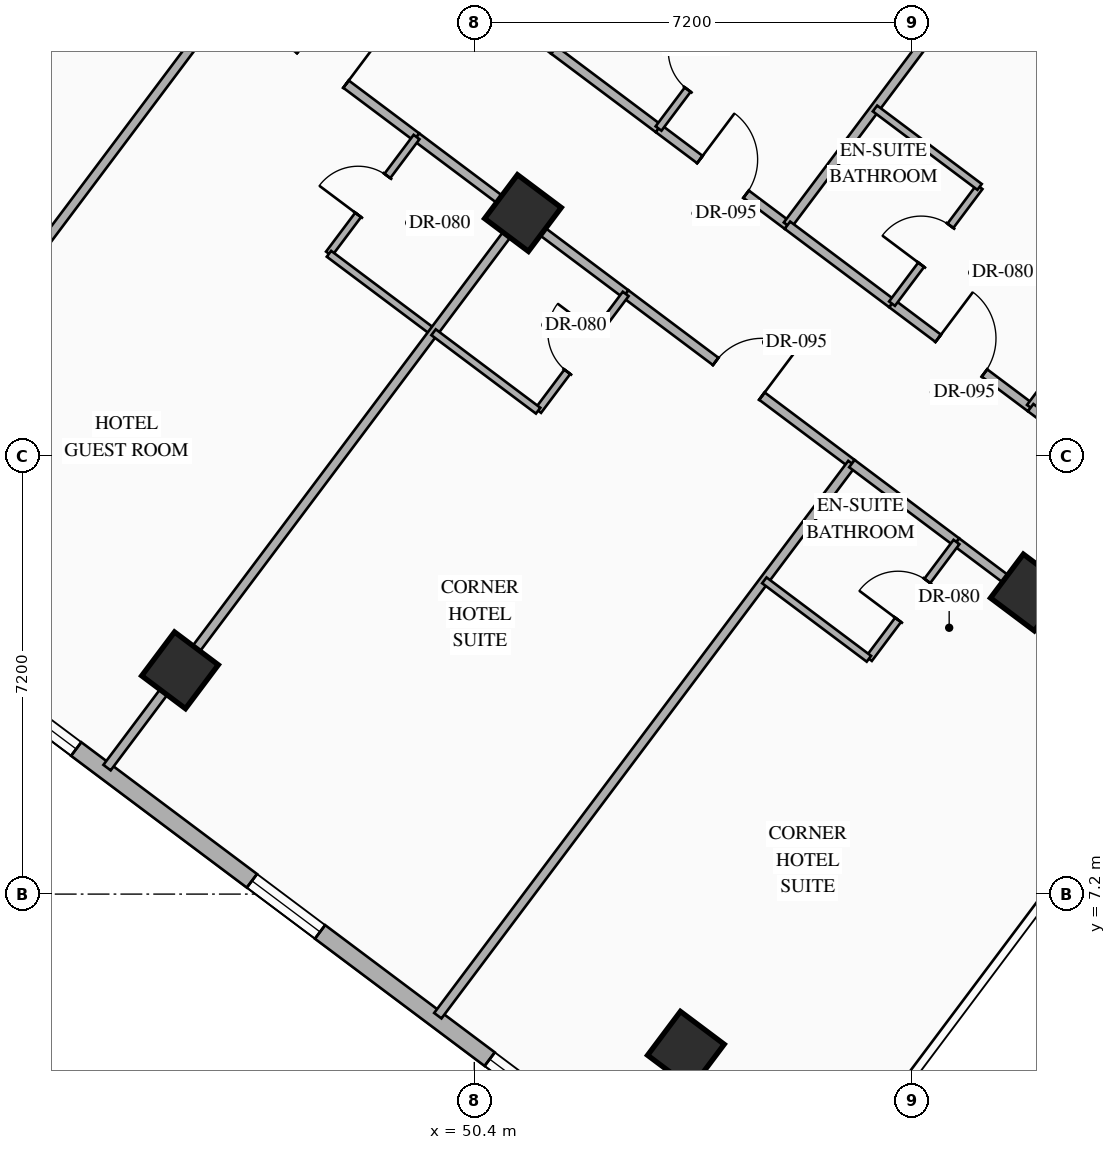
"""IFC4 building model, lengths in metres.
Left out: names, types, materials, properties, quantities, classifications, styles, units other than length and angle.
Written with IfcOpenShell. Run it as: python <this file> out.ifc"""

import sys

from ifc_helpers import new_model, si_unit, direction, frame, frame_2d, origin, origin_2d, place, context, subcontext, project, spatial, rectangle, hollow_rectangle, extrude, element, fill, save


model = new_model("IFC4")
c1 = context("Model", 3, precision=1e-05, world=origin(), true_north=direction((0.0, 1.0)))
c2 = subcontext(c1, "Body", "Model", "MODEL_VIEW")
j1 = project(units=[si_unit("LENGTHUNIT", "METRE"), si_unit("PLANEANGLEUNIT", "RADIAN")], contexts=[c1])
p1 = place(None, origin())
s1 = spatial("IfcSite", under=j1, at=p1, CompositionType="ELEMENT")
p2 = place(p1, origin())
s2 = spatial("IfcBuilding", under=s1, at=p2, CompositionType="ELEMENT")
p3 = place(p2, frame((0.0, 0.0, 81.3)))
s3 = spatial("IfcBuildingStorey", under=s2, at=p3, CompositionType="ELEMENT", Elevation=81.3)
for number, where, z_axis, x_axis in (
    (1, (45.56, 10.88, 0.0), (0.0, 0.0, 1.0), (0.8, -0.6, 0.0)),
    (2, (51.2, 18.4, 0.0), (0.0, 0.0, 1.0), (0.8, -0.6, 0.0)),
    (3, (53.88, 4.64, 0.0), (0.0, 0.0, 1.0), (0.8, -0.6, 0.0)),
    (4, (59.52, 12.16, 0.0), (0.0, 0.0, 1.0), (0.8, -0.6, 0.0)),
):
    element("IfcColumn", number, at=place(p3, frame(where, z_axis=z_axis, x_axis=x_axis)), inside=s3, PredefinedType="COLUMN", context=c2, shape_type="SweptSolid", body=[
        extrude(hollow_rectangle(XDim=0.9, YDim=0.9, WallThickness=0.036, at=origin_2d()), origin(), (0.0, 0.0, 1.0), 3.35),
    ])
p4 = place(p3, frame((53.318, 2.487, 0.0), z_axis=(0.0, 0.0, 1.0), x_axis=(-0.800004174678, 0.599994433723, 0.0)))
e5 = element("IfcWall", 5, at=p4, inside=s3, PredefinedType="STANDARD", context=c2, shape_type="SweptSolid", body=[
    extrude(rectangle(XDim=35.089, YDim=0.28, at=frame_2d((17.544, 0.0))), origin(), (0.0, 0.0, 1.0), 3.13),
])
p5 = place(p4, frame((1.931, 0.0, 0.85)))
e6 = element("IfcOpeningElement", 6, at=p5, cuts=e5, PredefinedType="OPENING", context=c2, shape_type="SweptSolid", body=[
    extrude(rectangle(XDim=1.4, YDim=1.8, at=frame_2d((0.7, 0.9))), frame((0.0, 0.15, 0.0), z_axis=(0.0, -1.0, 0.0), x_axis=(1.0, 0.0, 0.0)), (0.0, 0.0, 1.0), 0.3),
])
p6 = place(p4, frame((6.819, 0.0, 0.85)))
e7 = element("IfcOpeningElement", 7, at=p6, cuts=e5, PredefinedType="OPENING", context=c2, shape_type="SweptSolid", body=[
    extrude(rectangle(XDim=1.4, YDim=1.8, at=frame_2d((0.7, 0.9))), frame((0.0, 0.15, 0.0), z_axis=(0.0, -1.0, 0.0), x_axis=(1.0, 0.0, 0.0)), (0.0, 0.0, 1.0), 0.3),
])
p7 = place(p4, frame((11.832, 0.0, 0.85)))
e8 = element("IfcOpeningElement", 8, at=p7, cuts=e5, PredefinedType="OPENING", context=c2, shape_type="SweptSolid", body=[
    extrude(rectangle(XDim=1.4, YDim=1.8, at=frame_2d((0.7, 0.9))), frame((0.0, 0.15, 0.0), z_axis=(0.0, -1.0, 0.0), x_axis=(1.0, 0.0, 0.0)), (0.0, 0.0, 1.0), 0.3),
])
p8 = place(p4, frame((17.647, 0.0, 0.85)))
e9 = element("IfcOpeningElement", 9, at=p8, cuts=e5, PredefinedType="OPENING", context=c2, shape_type="SweptSolid", body=[
    extrude(rectangle(XDim=1.4, YDim=1.8, at=frame_2d((0.7, 0.9))), frame((0.0, 0.15, 0.0), z_axis=(0.0, -1.0, 0.0), x_axis=(1.0, 0.0, 0.0)), (0.0, 0.0, 1.0), 0.3),
])
p9 = place(p4, frame((21.857, 0.0, 0.85)))
e10 = element("IfcOpeningElement", 10, at=p9, cuts=e5, PredefinedType="OPENING", context=c2, shape_type="SweptSolid", body=[
    extrude(rectangle(XDim=1.4, YDim=1.8, at=frame_2d((0.7, 0.9))), frame((0.0, 0.15, 0.0), z_axis=(0.0, -1.0, 0.0), x_axis=(1.0, 0.0, 0.0)), (0.0, 0.0, 1.0), 0.3),
])
p10 = place(p4, frame((26.87, 0.0, 0.85)))
e11 = element("IfcOpeningElement", 11, at=p10, cuts=e5, PredefinedType="OPENING", context=c2, shape_type="SweptSolid", body=[
    extrude(rectangle(XDim=1.4, YDim=1.8, at=frame_2d((0.7, 0.9))), frame((0.0, 0.15, 0.0), z_axis=(0.0, -1.0, 0.0), x_axis=(1.0, 0.0, 0.0)), (0.0, 0.0, 1.0), 0.3),
])
p11 = place(p4, frame((31.757, 0.0, 0.85)))
e12 = element("IfcOpeningElement", 12, at=p11, cuts=e5, PredefinedType="OPENING", context=c2, shape_type="SweptSolid", body=[
    extrude(rectangle(XDim=1.4, YDim=1.8, at=frame_2d((0.7, 0.9))), frame((0.0, 0.15, 0.0), z_axis=(0.0, -1.0, 0.0), x_axis=(1.0, 0.0, 0.0)), (0.0, 0.0, 1.0), 0.3),
])
p12 = place(p3, frame((39.464, 12.752, 0.0), z_axis=(0.0, 0.0, 1.0), x_axis=(0.6, 0.8, 0.0)))
e13 = element("IfcWall", 13, at=p12, inside=s3, PredefinedType="PARTITIONING", context=c2, shape_type="SweptSolid", body=[
    extrude(rectangle(XDim=11.51, YDim=0.15, at=frame_2d((5.755, 0.0))), origin(), (0.0, 0.0, 1.0), 3.13),
])
p13 = place(p3, frame((49.59, 22.67, 0.0), z_axis=(0.0, 0.0, 1.0), x_axis=(0.800011056104, -0.599985258246, 0.0)))
e14 = element("IfcWall", 14, at=p13, inside=s3, PredefinedType="PARTITIONING", context=c2, shape_type="SweptSolid", body=[
    extrude(rectangle(XDim=2.65, YDim=0.15, at=frame_2d((1.325, 0.0))), origin(), (0.0, 0.0, 1.0), 2.775),
])
p14 = place(p13, frame((0.85, 0.0, 0.0)))
e15 = element("IfcOpeningElement", 15, at=p14, cuts=e14, PredefinedType="OPENING", context=c2, shape_type="SweptSolid", body=[
    extrude(rectangle(XDim=0.95, YDim=2.15, at=frame_2d((0.475, 1.075))), frame((0.0, 0.085, 0.0), z_axis=(0.0, -1.0, 0.0), x_axis=(1.0, 0.0, 0.0)), (0.0, 0.0, 1.0), 0.17),
])
p15 = place(p3, frame((51.71, 21.08, 0.0), z_axis=(0.0, 0.0, 1.0), x_axis=(0.599996617946, 0.80000253653, 0.0)))
e16 = element("IfcWall", 16, at=p15, inside=s3, PredefinedType="PARTITIONING", context=c2, shape_type="SweptSolid", body=[
    extrude(rectangle(XDim=11.55, YDim=0.15, at=frame_2d((5.775, 0.0))), origin(), (0.0, 0.0, 1.0), 3.13),
])
p16 = place(p3, frame((51.71, 21.08, 0.0), z_axis=(0.0, 0.0, 1.0), x_axis=(0.79998637334, -0.60001816845, 0.0)))
e17 = element("IfcWall", 17, at=p16, inside=s3, PredefinedType="PARTITIONING", context=c2, shape_type="SweptSolid", body=[
    extrude(rectangle(XDim=2.15, YDim=0.15, at=frame_2d((1.075, 0.0))), origin(), (0.0, 0.0, 1.0), 2.775),
])
p17 = place(p3, frame((53.43, 19.79, 0.0), z_axis=(0.0, 0.0, 1.0), x_axis=(0.8, -0.6, 0.0)))
e18 = element("IfcWall", 18, at=p17, inside=s3, PredefinedType="PARTITIONING", context=c2, shape_type="SweptSolid", body=[
    extrude(rectangle(XDim=2.65, YDim=0.15, at=frame_2d((1.325, 0.0))), origin(), (0.0, 0.0, 1.0), 2.775),
])
p18 = place(p17, frame((0.85, 0.0, 0.0)))
e19 = element("IfcOpeningElement", 19, at=p18, cuts=e18, PredefinedType="OPENING", context=c2, shape_type="SweptSolid", body=[
    extrude(rectangle(XDim=0.95, YDim=2.15, at=frame_2d((0.475, 1.075))), frame((0.0, 0.085, 0.0), z_axis=(0.0, -1.0, 0.0), x_axis=(1.0, 0.0, 0.0)), (0.0, 0.0, 1.0), 0.17),
])
p19 = place(p3, frame((53.43, 19.79, 0.0), z_axis=(0.0, 0.0, 1.0), x_axis=(0.600065100855, 0.79995117022, 0.0)))
e20 = element("IfcWall", 20, at=p19, inside=s3, PredefinedType="PARTITIONING", context=c2, shape_type="SweptSolid", body=[
    extrude(rectangle(XDim=2.4, YDim=0.12, at=frame_2d((1.2, 0.0))), origin(), (0.0, 0.0, 1.0), 3.13),
])
p20 = place(p19, frame((0.8, 0.0, 0.0)))
e21 = element("IfcOpeningElement", 21, at=p20, cuts=e20, PredefinedType="OPENING", context=c2, shape_type="SweptSolid", body=[
    extrude(rectangle(XDim=0.8, YDim=2.06, at=frame_2d((0.4, 1.03))), frame((0.0, 0.07, 0.0), z_axis=(0.0, -1.0, 0.0), x_axis=(1.0, 0.0, 0.0)), (0.0, 0.0, 1.0), 0.14),
])
p21 = place(p3, frame((55.55, 18.2, 0.0), z_axis=(0.0, 0.0, 1.0), x_axis=(0.599996617946, 0.80000253653, 0.0)))
e22 = element("IfcWall", 22, at=p21, inside=s3, PredefinedType="PARTITIONING", context=c2, shape_type="SweptSolid", body=[
    extrude(rectangle(XDim=11.55, YDim=0.15, at=frame_2d((5.775, 0.0))), origin(), (0.0, 0.0, 1.0), 3.13),
])
p22 = place(p3, frame((55.55, 18.2, 0.0), z_axis=(0.0, 0.0, 1.0), x_axis=(0.79998637334, -0.60001816845, 0.0)))
e23 = element("IfcWall", 23, at=p22, inside=s3, PredefinedType="PARTITIONING", context=c2, shape_type="SweptSolid", body=[
    extrude(rectangle(XDim=2.15, YDim=0.15, at=frame_2d((1.075, 0.0))), origin(), (0.0, 0.0, 1.0), 2.775),
])
p23 = place(p3, frame((57.27, 16.91, 0.0), z_axis=(0.0, 0.0, 1.0), x_axis=(0.800010279488, -0.599986293772, 0.0)))
e24 = element("IfcWall", 24, at=p23, inside=s3, PredefinedType="PARTITIONING", context=c2, shape_type="SweptSolid", body=[
    extrude(rectangle(XDim=2.85, YDim=0.15, at=frame_2d((1.425, 0.0))), origin(), (0.0, 0.0, 1.0), 2.775),
])
p24 = place(p23, frame((0.95, 0.0, 0.0)))
e25 = element("IfcOpeningElement", 25, at=p24, cuts=e24, PredefinedType="OPENING", context=c2, shape_type="SweptSolid", body=[
    extrude(rectangle(XDim=0.95, YDim=2.15, at=frame_2d((0.475, 1.075))), frame((0.0, 0.085, 0.0), z_axis=(0.0, -1.0, 0.0), x_axis=(1.0, 0.0, 0.0)), (0.0, 0.0, 1.0), 0.17),
])
p25 = place(p3, frame((57.27, 16.91, 0.0), z_axis=(0.0, 0.0, 1.0), x_axis=(0.599951172744, 0.800036618114, 0.0)))
e26 = element("IfcWall", 26, at=p25, inside=s3, PredefinedType="PARTITIONING", context=c2, shape_type="SweptSolid", body=[
    extrude(rectangle(XDim=2.4, YDim=0.12, at=frame_2d((1.2, 0.0))), origin(), (0.0, 0.0, 1.0), 3.13),
])
p26 = place(p25, frame((0.8, 0.0, 0.0)))
e27 = element("IfcOpeningElement", 27, at=p26, cuts=e26, PredefinedType="OPENING", context=c2, shape_type="SweptSolid", body=[
    extrude(rectangle(XDim=0.8, YDim=2.06, at=frame_2d((0.4, 1.03))), frame((0.0, 0.07, 0.0), z_axis=(0.0, -1.0, 0.0), x_axis=(1.0, 0.0, 0.0)), (0.0, 0.0, 1.0), 0.14),
])
p27 = place(p3, frame((56.99, 20.12, 0.0), z_axis=(0.0, 0.0, 1.0), x_axis=(0.79998637334, -0.60001816845, 0.0)))
e28 = element("IfcWall", 28, at=p27, inside=s3, PredefinedType="PARTITIONING", context=c2, shape_type="SweptSolid", body=[
    extrude(rectangle(XDim=2.15, YDim=0.12, at=frame_2d((1.075, 0.0))), origin(), (0.0, 0.0, 1.0), 3.13),
])
p28 = place(p3, frame((59.55, 15.2, 0.0), z_axis=(0.0, 0.0, 1.0), x_axis=(0.599996617946, 0.80000253653, 0.0)))
e29 = element("IfcWall", 29, at=p28, inside=s3, PredefinedType="PARTITIONING", context=c2, shape_type="SweptSolid", body=[
    extrude(rectangle(XDim=11.55, YDim=0.15, at=frame_2d((5.775, 0.0))), origin(), (0.0, 0.0, 1.0), 3.13),
])
p29 = place(p3, frame((59.55, 15.2, 0.0), z_axis=(0.0, 0.0, 1.0), x_axis=(0.79998637334, -0.60001816845, 0.0)))
e30 = element("IfcWall", 30, at=p29, inside=s3, PredefinedType="PARTITIONING", context=c2, shape_type="SweptSolid", body=[
    extrude(rectangle(XDim=2.15, YDim=0.15, at=frame_2d((1.075, 0.0))), origin(), (0.0, 0.0, 1.0), 2.775),
])
p30 = place(p3, frame((46.37, 21.96, 0.0), z_axis=(0.0, 0.0, 1.0), x_axis=(0.799977170108, -0.600030438649, 0.0)))
e31 = element("IfcWall", 31, at=p30, inside=s3, PredefinedType="PARTITIONING", context=c2, shape_type="SweptSolid", body=[
    extrude(rectangle(XDim=3.85, YDim=0.15, at=frame_2d((1.925, 0.0))), origin(), (0.0, 0.0, 1.0), 2.425),
])
p31 = place(p30, frame((1.45, 0.0, 0.0)))
e32 = element("IfcOpeningElement", 32, at=p31, cuts=e31, PredefinedType="OPENING", context=c2, shape_type="SweptSolid", body=[
    extrude(rectangle(XDim=0.95, YDim=2.15, at=frame_2d((0.475, 1.075))), frame((0.0, 0.085, 0.0), z_axis=(0.0, -1.0, 0.0), x_axis=(1.0, 0.0, 0.0)), (0.0, 0.0, 1.0), 0.17),
])
p32 = place(p3, frame((49.45, 19.65, 0.0), z_axis=(0.0, 0.0, 1.0), x_axis=(0.800040880289, -0.59994548908, 0.0)))
e33 = element("IfcWall", 33, at=p32, inside=s3, PredefinedType="PARTITIONING", context=c2, shape_type="SweptSolid", body=[
    extrude(rectangle(XDim=2.15, YDim=0.15, at=frame_2d((1.075, 0.0))), origin(), (0.0, 0.0, 1.0), 2.425),
])
p33 = place(p3, frame((48.01, 17.73, 0.0), z_axis=(0.0, 0.0, 1.0), x_axis=(0.6, 0.8, 0.0)))
e34 = element("IfcWall", 34, at=p33, inside=s3, PredefinedType="PARTITIONING", context=c2, shape_type="SweptSolid", body=[
    extrude(rectangle(XDim=2.4, YDim=0.12, at=frame_2d((1.2, 0.0))), origin(), (0.0, 0.0, 1.0), 3.13),
])
p34 = place(p33, frame((0.8, 0.0, 0.0)))
e35 = element("IfcOpeningElement", 35, at=p34, cuts=e34, PredefinedType="OPENING", context=c2, shape_type="SweptSolid", body=[
    extrude(rectangle(XDim=0.8, YDim=2.06, at=frame_2d((0.4, 1.03))), frame((0.0, 0.07, 0.0), z_axis=(0.0, -1.0, 0.0), x_axis=(1.0, 0.0, 0.0)), (0.0, 0.0, 1.0), 0.14),
])
p35 = place(p3, frame((48.01, 17.73, 0.0), z_axis=(0.0, 0.0, 1.0), x_axis=(0.79998637334, -0.60001816845, 0.0)))
e36 = element("IfcWall", 36, at=p35, inside=s3, PredefinedType="PARTITIONING", context=c2, shape_type="SweptSolid", body=[
    extrude(rectangle(XDim=2.15, YDim=0.12, at=frame_2d((1.075, 0.0))), origin(), (0.0, 0.0, 1.0), 3.13),
])
p36 = place(p3, frame((44.36, 9.28, 0.0), z_axis=(0.0, 0.0, 1.0), x_axis=(0.599986233332, 0.800010324816, 0.0)))
e37 = element("IfcWall", 37, at=p36, inside=s3, PredefinedType="PARTITIONING", context=c2, shape_type="SweptSolid", body=[
    extrude(rectangle(XDim=11.35, YDim=0.15, at=frame_2d((5.675, 0.0))), origin(), (0.0, 0.0, 1.0), 2.425),
])
p37 = place(p3, frame((51.17, 18.36, 0.0), z_axis=(0.0, 0.0, 1.0), x_axis=(0.79998637334, -0.60001816845, 0.0)))
e38 = element("IfcWall", 38, at=p37, inside=s3, PredefinedType="PARTITIONING", context=c2, shape_type="SweptSolid", body=[
    extrude(rectangle(XDim=2.15, YDim=0.15, at=frame_2d((1.075, 0.0))), origin(), (0.0, 0.0, 1.0), 2.425),
])
p38 = place(p3, frame((52.89, 17.07, 0.0), z_axis=(0.0, 0.0, 1.0), x_axis=(0.800012600101, -0.599983199498, 0.0)))
e39 = element("IfcWall", 39, at=p38, inside=s3, PredefinedType="PARTITIONING", context=c2, shape_type="SweptSolid", body=[
    extrude(rectangle(XDim=4.65, YDim=0.15, at=frame_2d((2.325, 0.0))), origin(), (0.0, 0.0, 1.0), 2.425),
])
p39 = place(p38, frame((1.85, 0.0, 0.0)))
e40 = element("IfcOpeningElement", 40, at=p39, cuts=e39, PredefinedType="OPENING", context=c2, shape_type="SweptSolid", body=[
    extrude(rectangle(XDim=0.95, YDim=2.15, at=frame_2d((0.475, 1.075))), frame((0.0, 0.085, 0.0), z_axis=(0.0, -1.0, 0.0), x_axis=(1.0, 0.0, 0.0)), (0.0, 0.0, 1.0), 0.17),
])
p40 = place(p3, frame((51.45, 15.15, 0.0), z_axis=(0.0, 0.0, 1.0), x_axis=(0.599951172744, 0.800036618114, 0.0)))
e41 = element("IfcWall", 41, at=p40, inside=s3, PredefinedType="PARTITIONING", context=c2, shape_type="SweptSolid", body=[
    extrude(rectangle(XDim=2.4, YDim=0.12, at=frame_2d((1.2, 0.0))), origin(), (0.0, 0.0, 1.0), 3.13),
])
p41 = place(p40, frame((0.8, 0.0, 0.0)))
e42 = element("IfcOpeningElement", 42, at=p41, cuts=e41, PredefinedType="OPENING", context=c2, shape_type="SweptSolid", body=[
    extrude(rectangle(XDim=0.8, YDim=2.06, at=frame_2d((0.4, 1.03))), frame((0.0, 0.07, 0.0), z_axis=(0.0, -1.0, 0.0), x_axis=(1.0, 0.0, 0.0)), (0.0, 0.0, 1.0), 0.14),
])
p42 = place(p3, frame((49.73, 16.44, 0.0), z_axis=(0.0, 0.0, 1.0), x_axis=(0.79998637334, -0.60001816845, 0.0)))
e43 = element("IfcWall", 43, at=p42, inside=s3, PredefinedType="PARTITIONING", context=c2, shape_type="SweptSolid", body=[
    extrude(rectangle(XDim=2.15, YDim=0.12, at=frame_2d((1.075, 0.0))), origin(), (0.0, 0.0, 1.0), 3.13),
])
p43 = place(p3, frame((49.8, 5.2, 0.0), z_axis=(0.0, 0.0, 1.0), x_axis=(0.6, 0.8, 0.0)))
e44 = element("IfcWall", 44, at=p43, inside=s3, PredefinedType="PARTITIONING", context=c2, shape_type="SweptSolid", body=[
    extrude(rectangle(XDim=11.35, YDim=0.15, at=frame_2d((5.675, 0.0))), origin(), (0.0, 0.0, 1.0), 3.13),
])
p44 = place(p3, frame((56.61, 14.28, 0.0), z_axis=(0.0, 0.0, 1.0), x_axis=(0.79998637334, -0.60001816845, 0.0)))
e45 = element("IfcWall", 45, at=p44, inside=s3, PredefinedType="PARTITIONING", context=c2, shape_type="SweptSolid", body=[
    extrude(rectangle(XDim=2.15, YDim=0.15, at=frame_2d((1.075, 0.0))), origin(), (0.0, 0.0, 1.0), 2.425),
])
p45 = place(p3, frame((58.33, 12.99, 0.0), z_axis=(0.0, 0.0, 1.0), x_axis=(0.799993779569, -0.600008293819, 0.0)))
e46 = element("IfcWall", 46, at=p45, inside=s3, PredefinedType="PARTITIONING", context=c2, shape_type="SweptSolid", body=[
    extrude(rectangle(XDim=4.71, YDim=0.15, at=frame_2d((2.355, 0.0))), origin(), (0.0, 0.0, 1.0), 2.425),
])
p46 = place(p45, frame((3.23, 0.0, 0.0)))
e47 = element("IfcOpeningElement", 47, at=p46, cuts=e46, PredefinedType="OPENING", context=c2, shape_type="SweptSolid", body=[
    extrude(rectangle(XDim=0.95, YDim=2.15, at=frame_2d((0.475, 1.075))), frame((0.0, 0.085, 0.0), z_axis=(0.0, -1.0, 0.0), x_axis=(1.0, 0.0, 0.0)), (0.0, 0.0, 1.0), 0.17),
])
p47 = place(p3, frame((56.89, 11.07, 0.0), z_axis=(0.0, 0.0, 1.0), x_axis=(0.600065100855, 0.79995117022, 0.0)))
e48 = element("IfcWall", 48, at=p47, inside=s3, PredefinedType="PARTITIONING", context=c2, shape_type="SweptSolid", body=[
    extrude(rectangle(XDim=2.4, YDim=0.12, at=frame_2d((1.2, 0.0))), origin(), (0.0, 0.0, 1.0), 3.13),
])
p48 = place(p47, frame((0.8, 0.0, 0.0)))
e49 = element("IfcOpeningElement", 49, at=p48, cuts=e48, PredefinedType="OPENING", context=c2, shape_type="SweptSolid", body=[
    extrude(rectangle(XDim=0.8, YDim=2.06, at=frame_2d((0.4, 1.03))), frame((0.0, 0.07, 0.0), z_axis=(0.0, -1.0, 0.0), x_axis=(1.0, 0.0, 0.0)), (0.0, 0.0, 1.0), 0.14),
])
p49 = place(p3, frame((55.17, 12.36, 0.0), z_axis=(0.0, 0.0, 1.0), x_axis=(0.79998637334, -0.60001816845, 0.0)))
e50 = element("IfcWall", 50, at=p49, inside=s3, PredefinedType="PARTITIONING", context=c2, shape_type="SweptSolid", body=[
    extrude(rectangle(XDim=2.15, YDim=0.12, at=frame_2d((1.075, 0.0))), origin(), (0.0, 0.0, 1.0), 3.13),
])
p50 = place(p5, origin())
e51 = element("IfcWindow", 51, at=p50, inside=s3, PartitioningType="SINGLE_PANEL", PredefinedType="WINDOW", context=c2, shape_type="SweptSolid", body=[
    extrude(rectangle(XDim=1.4, YDim=1.8, at=frame_2d((0.7, 0.9))), frame((0.0, 0.03, 0.0), z_axis=(0.0, -1.0, 0.0), x_axis=(1.0, 0.0, 0.0)), (0.0, 0.0, 1.0), 0.06),
])
fill(e6, e51)
p51 = place(p6, origin())
e52 = element("IfcWindow", 52, at=p51, inside=s3, PartitioningType="SINGLE_PANEL", PredefinedType="WINDOW", context=c2, shape_type="SweptSolid", body=[
    extrude(rectangle(XDim=1.4, YDim=1.8, at=frame_2d((0.7, 0.9))), frame((0.0, 0.03, 0.0), z_axis=(0.0, -1.0, 0.0), x_axis=(1.0, 0.0, 0.0)), (0.0, 0.0, 1.0), 0.06),
])
fill(e7, e52)
p52 = place(p7, origin())
e53 = element("IfcWindow", 53, at=p52, inside=s3, PartitioningType="SINGLE_PANEL", PredefinedType="WINDOW", context=c2, shape_type="SweptSolid", body=[
    extrude(rectangle(XDim=1.4, YDim=1.8, at=frame_2d((0.7, 0.9))), frame((0.0, 0.03, 0.0), z_axis=(0.0, -1.0, 0.0), x_axis=(1.0, 0.0, 0.0)), (0.0, 0.0, 1.0), 0.06),
])
fill(e8, e53)
p53 = place(p18, origin())
e54 = element("IfcDoor", 54, at=p53, inside=s3, OperationType="SINGLE_SWING_LEFT", PredefinedType="DOOR", context=c2, shape_type="SweptSolid", body=[
    extrude(rectangle(XDim=0.95, YDim=2.15, at=frame_2d((0.475, 1.075))), frame((0.0, 0.025, 0.0), z_axis=(0.0, -1.0, 0.0), x_axis=(1.0, 0.0, 0.0)), (0.0, 0.0, 1.0), 0.05),
])
fill(e19, e54)
p54 = place(p20, origin())
e55 = element("IfcDoor", 55, at=p54, inside=s3, OperationType="SINGLE_SWING_RIGHT", PredefinedType="DOOR", context=c2, shape_type="SweptSolid", body=[
    extrude(rectangle(XDim=0.8, YDim=2.06, at=frame_2d((0.4, 1.03))), frame((0.0, 0.025, 0.0), z_axis=(0.0, -1.0, 0.0), x_axis=(1.0, 0.0, 0.0)), (0.0, 0.0, 1.0), 0.05),
])
fill(e21, e55)
p55 = place(p24, origin())
e56 = element("IfcDoor", 56, at=p55, inside=s3, OperationType="SINGLE_SWING_LEFT", PredefinedType="DOOR", context=c2, shape_type="SweptSolid", body=[
    extrude(rectangle(XDim=0.95, YDim=2.15, at=frame_2d((0.475, 1.075))), frame((0.0, 0.025, 0.0), z_axis=(0.0, -1.0, 0.0), x_axis=(1.0, 0.0, 0.0)), (0.0, 0.0, 1.0), 0.05),
])
fill(e25, e56)
p56 = place(p26, origin())
e57 = element("IfcDoor", 57, at=p56, inside=s3, OperationType="SINGLE_SWING_LEFT", PredefinedType="DOOR", context=c2, shape_type="SweptSolid", body=[
    extrude(rectangle(XDim=0.8, YDim=2.06, at=frame_2d((0.4, 1.03))), frame((0.0, 0.025, 0.0), z_axis=(0.0, -1.0, 0.0), x_axis=(1.0, 0.0, 0.0)), (0.0, 0.0, 1.0), 0.05),
])
fill(e27, e57)
p57 = place(p31, origin())
e58 = element("IfcDoor", 58, at=p57, inside=s3, OperationType="SINGLE_SWING_RIGHT", PredefinedType="DOOR", context=c2, shape_type="SweptSolid", body=[
    extrude(rectangle(XDim=0.95, YDim=2.15, at=frame_2d((0.475, 1.075))), frame((0.0, 0.025, 0.0), z_axis=(0.0, -1.0, 0.0), x_axis=(1.0, 0.0, 0.0)), (0.0, 0.0, 1.0), 0.05),
])
fill(e32, e58)
p58 = place(p34, origin())
e59 = element("IfcDoor", 59, at=p58, inside=s3, OperationType="SINGLE_SWING_LEFT", PredefinedType="DOOR", context=c2, shape_type="SweptSolid", body=[
    extrude(rectangle(XDim=0.8, YDim=2.06, at=frame_2d((0.4, 1.03))), frame((0.0, 0.025, 0.0), z_axis=(0.0, -1.0, 0.0), x_axis=(1.0, 0.0, 0.0)), (0.0, 0.0, 1.0), 0.05),
])
fill(e35, e59)
p59 = place(p39, origin())
e60 = element("IfcDoor", 60, at=p59, inside=s3, OperationType="SINGLE_SWING_RIGHT", PredefinedType="DOOR", context=c2, shape_type="SweptSolid", body=[
    extrude(rectangle(XDim=0.95, YDim=2.15, at=frame_2d((0.475, 1.075))), frame((0.0, 0.025, 0.0), z_axis=(0.0, -1.0, 0.0), x_axis=(1.0, 0.0, 0.0)), (0.0, 0.0, 1.0), 0.05),
])
fill(e40, e60)
p60 = place(p41, origin())
e61 = element("IfcDoor", 61, at=p60, inside=s3, OperationType="SINGLE_SWING_RIGHT", PredefinedType="DOOR", context=c2, shape_type="SweptSolid", body=[
    extrude(rectangle(XDim=0.8, YDim=2.06, at=frame_2d((0.4, 1.03))), frame((0.0, 0.025, 0.0), z_axis=(0.0, -1.0, 0.0), x_axis=(1.0, 0.0, 0.0)), (0.0, 0.0, 1.0), 0.05),
])
fill(e42, e61)
p61 = place(p48, origin())
e62 = element("IfcDoor", 62, at=p61, inside=s3, OperationType="SINGLE_SWING_LEFT", PredefinedType="DOOR", context=c2, shape_type="SweptSolid", body=[
    extrude(rectangle(XDim=0.8, YDim=2.06, at=frame_2d((0.4, 1.03))), frame((0.0, 0.025, 0.0), z_axis=(0.0, -1.0, 0.0), x_axis=(1.0, 0.0, 0.0)), (0.0, 0.0, 1.0), 0.05),
])
fill(e49, e62)
save(model, sys.argv[1])
